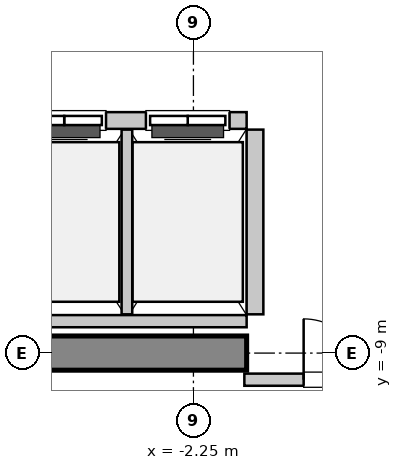
"""IFC4 building model, lengths in metres.
Left out: names, types, materials, properties, quantities, classifications, styles, units other than length and angle.
Written with IfcOpenShell. Run it as: python <this file> out.ifc"""

import sys

from ifc_helpers import new_model, si_unit, direction, frame, frame_2d, origin, place, context, subcontext, project, spatial, rectangle, extrude, source, transform, mapped, element, fill, save


model = new_model("IFC4")
c1 = context("Model", 3, precision=1e-05, world=origin(), true_north=direction((0.0, 1.0)))
c2 = subcontext(c1, "Body", "Model", "MODEL_VIEW")
j1 = project(units=[si_unit("LENGTHUNIT", "METRE"), si_unit("PLANEANGLEUNIT", "RADIAN")], contexts=[c1])
p1 = place(None, origin())
s1 = spatial("IfcSite", under=j1, at=p1, CompositionType="ELEMENT")
p2 = place(p1, origin())
s2 = spatial("IfcBuilding", under=s1, at=p2, CompositionType="ELEMENT")
p3 = place(p2, frame((0.0, 0.0, 240.8)))
s3 = spatial("IfcBuildingStorey", under=s2, at=p3, CompositionType="ELEMENT", Elevation=240.8)
m1 = source(origin(), c2, "Body", "SweptSolid", [
    extrude(rectangle(XDim=9.925, YDim=0.45, at=frame_2d((4.962, 0.0))), origin(), (0.0, 0.0, 1.0), 3.8),
])
p4 = place(p3, frame((-11.475, -9.0, 0.0), z_axis=(0.0, 0.0, 1.0), x_axis=(1.0, 0.0, 0.0)))
e1 = element("IfcWall", 1, at=p4, inside=s3, PredefinedType="SHEAR", context=c2, shape_type="MappedRepresentation", body=[
    mapped(m1, transform((0.0, 0.0, 0.0), x_axis=(1.0, 0.0, 0.0), y_axis=(0.0, 1.0, 0.0), z_axis=(0.0, 0.0, 1.0), scale=1.0)),
])
m2 = source(origin(), c2, "Body", "SweptSolid", [
    extrude(rectangle(XDim=3.2, YDim=0.22, at=frame_2d((1.6, 0.0))), origin(), (0.0, 0.0, 1.0), 3.535),
])
p5 = place(p3, frame((-1.55, -5.94, 0.0), z_axis=(0.0, 0.0, 1.0), x_axis=(-1.0, 0.0, 0.0)))
e2 = element("IfcWall", 2, at=p5, inside=s3, PredefinedType="SOLIDWALL", context=c2, shape_type="MappedRepresentation", body=[
    mapped(m2, transform((0.0, 0.0, 0.0), x_axis=(1.0, 0.0, 0.0), y_axis=(0.0, 1.0, 0.0), z_axis=(0.0, 0.0, 1.0), scale=1.0)),
])
p6 = place(p5, frame((1.85, 0.0, 0.0)))
e3 = element("IfcOpeningElement", 3, at=p6, cuts=e2, PredefinedType="OPENING", context=c2, shape_type="SweptSolid", body=[
    extrude(rectangle(XDim=1.1, YDim=2.2, at=frame_2d((0.55, 1.1))), frame((0.0, 0.12, 0.0), z_axis=(0.0, -1.0, 0.0), x_axis=(1.0, 0.0, 0.0)), (0.0, 0.0, 1.0), 0.24),
])
p7 = place(p5, frame((0.225, 0.0, 0.0)))
e4 = element("IfcOpeningElement", 4, at=p7, cuts=e2, PredefinedType="OPENING", context=c2, shape_type="SweptSolid", body=[
    extrude(rectangle(XDim=1.1, YDim=2.2, at=frame_2d((0.55, 1.1))), frame((0.0, 0.12, 0.0), z_axis=(0.0, -1.0, 0.0), x_axis=(1.0, 0.0, 0.0)), (0.0, 0.0, 1.0), 0.24),
])
m3 = source(origin(), c2, "Body", "SweptSolid", [
    extrude(rectangle(XDim=3.2, YDim=0.16, at=frame_2d((1.6, 0.0))), origin(), (0.0, 0.0, 1.0), 2.625),
])
p8 = place(p3, frame((-4.75, -8.58, 0.0), z_axis=(0.0, 0.0, 1.0), x_axis=(1.0, 0.0, 0.0)))
e5 = element("IfcWall", 5, at=p8, inside=s3, PredefinedType="PARTITIONING", context=c2, shape_type="MappedRepresentation", body=[
    mapped(m3, transform((0.0, 0.0, 0.0), x_axis=(1.0, 0.0, 0.0), y_axis=(0.0, 1.0, 0.0), z_axis=(0.0, 0.0, 1.0), scale=1.0)),
])
m4 = source(origin(), c2, "Body", "SweptSolid", [
    extrude(rectangle(XDim=2.43, YDim=0.14, at=frame_2d((1.215, 0.0))), origin(), (0.0, 0.0, 1.0), 3.535),
])
p9 = place(p3, frame((-3.125, -8.49, 0.0), z_axis=(0.0, 0.0, 1.0), x_axis=(0.0, 1.0, 0.0)))
e6 = element("IfcWall", 6, at=p9, inside=s3, PredefinedType="PARTITIONING", context=c2, shape_type="MappedRepresentation", body=[
    mapped(m4, transform((0.0, 0.0, 0.0), x_axis=(1.0, 0.0, 0.0), y_axis=(0.0, 1.0, 0.0), z_axis=(0.0, 0.0, 1.0), scale=1.0)),
])
m5 = source(origin(), c2, "Body", "SweptSolid", [
    extrude(rectangle(XDim=2.43, YDim=0.22, at=frame_2d((1.215, 0.0))), origin(), (0.0, 0.0, 1.0), 3.535),
])
p10 = place(p3, frame((-1.44, -8.49, 0.0), z_axis=(0.0, 0.0, 1.0), x_axis=(0.0, 1.0, 0.0)))
e7 = element("IfcWall", 7, at=p10, inside=s3, PredefinedType="SOLIDWALL", context=c2, shape_type="MappedRepresentation", body=[
    mapped(m5, transform((0.0, 0.0, 0.0), x_axis=(1.0, 0.0, 0.0), y_axis=(0.0, 1.0, 0.0), z_axis=(0.0, 0.0, 1.0), scale=1.0)),
])
m6 = source(origin(), c2, "Body", "SweptSolid", [
    extrude(rectangle(XDim=3.16, YDim=0.16, at=frame_2d((1.58, 0.0))), origin(), (0.0, 0.0, 1.0), 2.625),
])
p11 = place(p3, frame((-1.58, -9.35, 0.0), z_axis=(0.0, 0.0, 1.0), x_axis=(1.0, 0.0, 0.0)))
e8 = element("IfcWall", 8, at=p11, inside=s3, PredefinedType="PARTITIONING", context=c2, shape_type="MappedRepresentation", body=[
    mapped(m6, transform((0.0, 0.0, 0.0), x_axis=(1.0, 0.0, 0.0), y_axis=(0.0, 1.0, 0.0), z_axis=(0.0, 0.0, 1.0), scale=1.0)),
])
p12 = place(p11, frame((0.78, 0.0, 0.0)))
e9 = element("IfcOpeningElement", 9, at=p12, cuts=e8, PredefinedType="OPENING", context=c2, shape_type="SweptSolid", body=[
    extrude(rectangle(XDim=1.6, YDim=2.3, at=frame_2d((0.8, 1.15))), frame((0.0, 0.09, 0.0), z_axis=(0.0, -1.0, 0.0), x_axis=(1.0, 0.0, 0.0)), (0.0, 0.0, 1.0), 0.18),
])
m7 = source(origin(), c2, "Body", "SweptSolid", [
    extrude(rectangle(XDim=1.1, YDim=2.2, at=frame_2d((0.55, 1.1))), frame((0.0, 0.025, 0.0), z_axis=(0.0, -1.0, 0.0), x_axis=(1.0, 0.0, 0.0)), (0.0, 0.0, 1.0), 0.05),
])
p13 = place(p6, origin())
e10 = element("IfcDoor", 10, at=p13, inside=s3, OperationType="DOUBLE_DOOR_SLIDING", PredefinedType="DOOR", context=c2, shape_type="MappedRepresentation", body=[
    mapped(m7, transform((0.0, 0.0, 0.0), x_axis=(1.0, 0.0, 0.0), y_axis=(0.0, 1.0, 0.0), z_axis=(0.0, 0.0, 1.0), scale=1.0)),
])
fill(e3, e10)
p14 = place(p7, origin())
e11 = element("IfcDoor", 11, at=p14, inside=s3, OperationType="DOUBLE_DOOR_SLIDING", PredefinedType="DOOR", context=c2, shape_type="MappedRepresentation", body=[
    mapped(m7, transform((0.0, 0.0, 0.0), x_axis=(1.0, 0.0, 0.0), y_axis=(0.0, 1.0, 0.0), z_axis=(0.0, 0.0, 1.0), scale=1.0)),
])
fill(e4, e11)
m8 = source(origin(), c2, "Body", "SweptSolid", [
    extrude(rectangle(XDim=1.6, YDim=2.3, at=frame_2d((0.8, 1.15))), frame((0.0, 0.025, 0.0), z_axis=(0.0, -1.0, 0.0), x_axis=(1.0, 0.0, 0.0)), (0.0, 0.0, 1.0), 0.05),
])
p15 = place(p12, origin())
e12 = element("IfcDoor", 12, at=p15, inside=s3, OperationType="DOUBLE_DOOR_SINGLE_SWING", PredefinedType="DOOR", context=c2, shape_type="MappedRepresentation", body=[
    mapped(m8, transform((0.0, 0.0, 0.0), x_axis=(1.0, 0.0, 0.0), y_axis=(0.0, 1.0, 0.0), z_axis=(0.0, 0.0, 1.0), scale=1.0)),
])
fill(e9, e12)
save(model, sys.argv[1])
